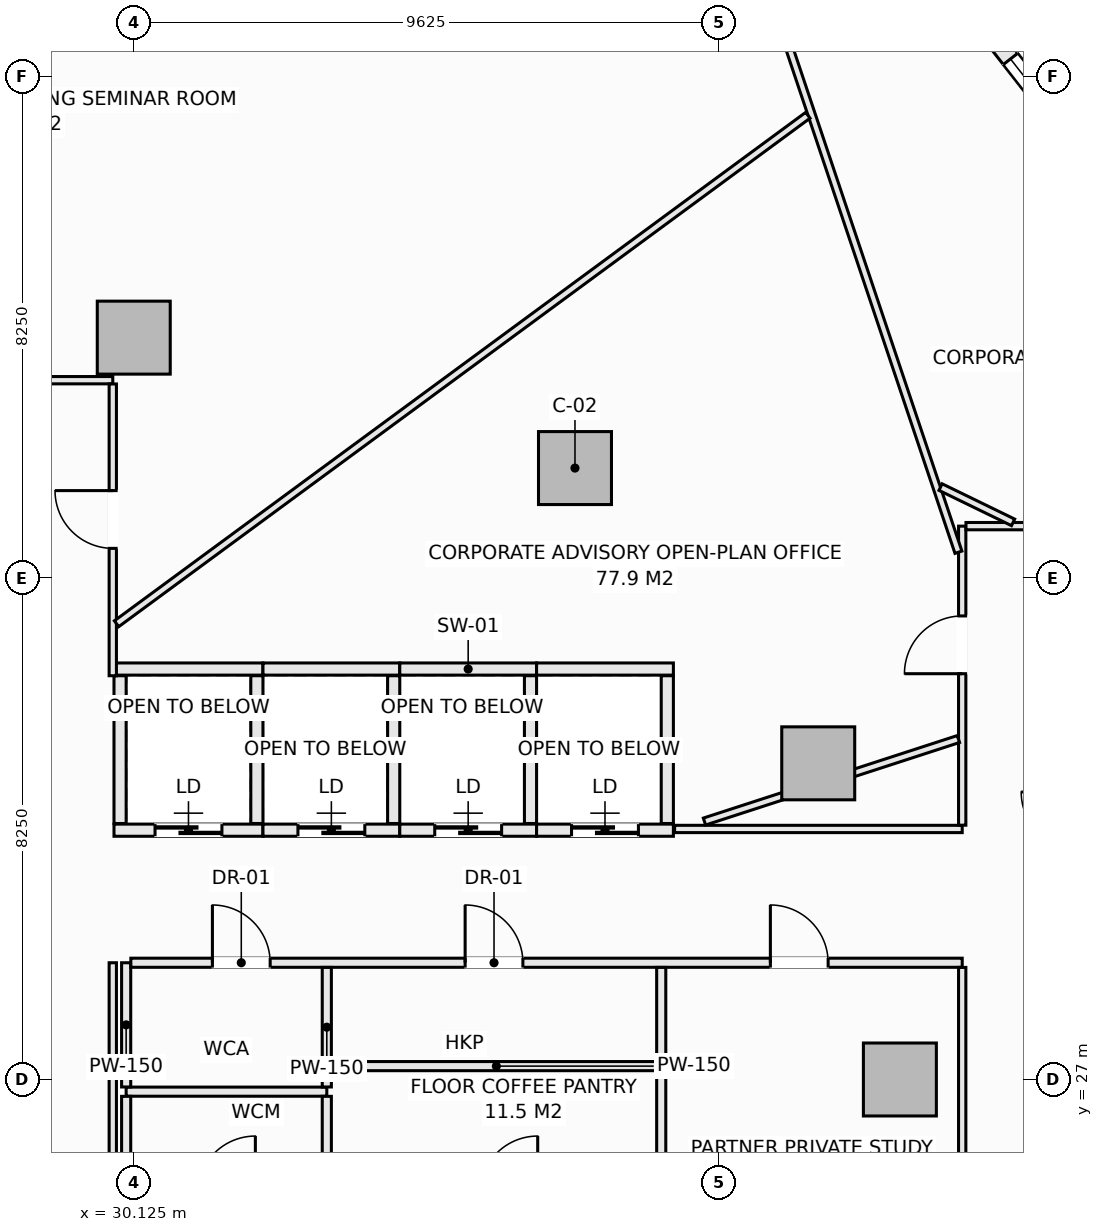
"""IFC4 building model, lengths in metres.
Left out: names, types, materials, properties, quantities, classifications, styles, units other than length and angle.
Written with IfcOpenShell. Run it as: python <this file> out.ifc"""

import sys

from ifc_helpers import new_model, si_unit, direction, frame, frame_2d, origin, origin_2d, place, context, subcontext, project, spatial, rectangle, extrude, element, fill, save


model = new_model("IFC4")
c1 = context("Model", 3, precision=1e-05, world=origin(), true_north=direction((0.0, 1.0)))
c2 = subcontext(c1, "Body", "Model", "MODEL_VIEW")
j1 = project(units=[si_unit("LENGTHUNIT", "METRE"), si_unit("PLANEANGLEUNIT", "RADIAN")], contexts=[c1])
p1 = place(None, origin())
s1 = spatial("IfcSite", under=j1, at=p1, CompositionType="ELEMENT")
p2 = place(p1, origin())
s2 = spatial("IfcBuilding", under=s1, at=p2, CompositionType="ELEMENT")
p3 = place(p2, frame((0.0, 0.0, 88.1)))
s3 = spatial("IfcBuildingStorey", under=s2, at=p3, CompositionType="ELEMENT", Elevation=88.1)
for number, where, z_axis, x_axis in (
    (1, (42.725, 27.0, -0.28), (0.0, 0.0, 1.0), (1.0, 0.0, 0.0)),
    (2, (41.382, 32.199, -0.28), (0.0, 0.0, 1.0), (1.0, 0.0, 0.0)),
    (3, (37.382, 37.055, -0.28), (0.0, 0.0, 1.0), (1.0, 0.0, 0.0)),
    (4, (30.125, 39.2, -0.28), (0.0, 0.0, 1.0), (1.0, 0.0, 0.0)),
):
    element("IfcColumn", number, at=place(p3, frame(where, z_axis=z_axis, x_axis=x_axis)), inside=s3, PredefinedType="COLUMN", context=c2, shape_type="SweptSolid", body=[
        extrude(rectangle(XDim=1.2, YDim=1.2, at=origin_2d()), origin(), (0.0, 0.0, 1.0), 3.85),
    ])
p4 = place(p3, frame((43.344, 45.316, 0.0), z_axis=(0.0, 0.0, 1.0), x_axis=(0.616434798832, -0.78740595552, 0.0)))
e5 = element("IfcWall", 5, at=p4, inside=s3, PredefinedType="SOLIDWALL", context=c2, shape_type="SweptSolid", body=[
    extrude(rectangle(XDim=6.294, YDim=0.3, at=frame_2d((3.147, 0.0))), origin(), (0.0, 0.0, 1.0), 3.093),
])
p5 = place(p4, frame((1.947, 0.0, 0.85)))
e6 = element("IfcOpeningElement", 6, at=p5, cuts=e5, PredefinedType="OPENING", context=c2, shape_type="SweptSolid", body=[
    extrude(rectangle(XDim=2.4, YDim=1.9, at=frame_2d((1.2, 0.95))), frame((0.0, 0.16, 0.0), z_axis=(0.0, -1.0, 0.0), x_axis=(1.0, 0.0, 0.0)), (0.0, 0.0, 1.0), 0.32),
])
p6 = place(p3, frame((29.8, 33.75, 0.0), z_axis=(0.0, 0.0, 1.0), x_axis=(1.0, 0.0, 0.0)))
e7 = element("IfcWall", 7, at=p6, inside=s3, PredefinedType="SOLIDWALL", context=c2, shape_type="SweptSolid", body=[
    extrude(rectangle(XDim=2.45, YDim=0.2, at=frame_2d((1.225, 0.0))), origin(), (0.0, 0.0, 1.0), 3.57),
])
p7 = place(p3, frame((29.8, 31.1, 0.0), z_axis=(0.0, 0.0, 1.0), x_axis=(1.0, 0.0, 0.0)))
e8 = element("IfcWall", 8, at=p7, inside=s3, PredefinedType="SOLIDWALL", context=c2, shape_type="SweptSolid", body=[
    extrude(rectangle(XDim=2.45, YDim=0.2, at=frame_2d((1.225, 0.0))), origin(), (0.0, 0.0, 1.0), 3.57),
])
p8 = place(p7, frame((0.675, 0.0, 0.0)))
e9 = element("IfcOpeningElement", 9, at=p8, cuts=e8, PredefinedType="OPENING", context=c2, shape_type="SweptSolid", body=[
    extrude(rectangle(XDim=1.1, YDim=2.2, at=frame_2d((0.55, 1.1))), frame((0.0, 0.11, 0.0), z_axis=(0.0, -1.0, 0.0), x_axis=(1.0, 0.0, 0.0)), (0.0, 0.0, 1.0), 0.22),
])
for number, where, z_axis, x_axis in (
    (10, (29.9, 31.21, 0.0), (0.0, 0.0, 1.0), (0.0, 1.0, 0.0)),
    (11, (32.15, 31.21, 0.0), (0.0, 0.0, 1.0), (0.0, 1.0, 0.0)),
):
    element("IfcWall", number, at=place(p3, frame(where, z_axis=z_axis, x_axis=x_axis)), inside=s3, PredefinedType="SOLIDWALL", context=c2, shape_type="SweptSolid", body=[
        extrude(rectangle(XDim=2.43, YDim=0.2, at=frame_2d((1.215, 0.0))), origin(), (0.0, 0.0, 1.0), 3.57),
    ])
p9 = place(p3, frame((32.25, 33.75, 0.0), z_axis=(0.0, 0.0, 1.0), x_axis=(1.0, 0.0, 0.0)))
e12 = element("IfcWall", 12, at=p9, inside=s3, PredefinedType="SOLIDWALL", context=c2, shape_type="SweptSolid", body=[
    extrude(rectangle(XDim=2.25, YDim=0.2, at=frame_2d((1.125, 0.0))), origin(), (0.0, 0.0, 1.0), 3.57),
])
p10 = place(p3, frame((32.25, 31.1, 0.0), z_axis=(0.0, 0.0, 1.0), x_axis=(1.0, 0.0, 0.0)))
e13 = element("IfcWall", 13, at=p10, inside=s3, PredefinedType="SOLIDWALL", context=c2, shape_type="SweptSolid", body=[
    extrude(rectangle(XDim=2.25, YDim=0.2, at=frame_2d((1.125, 0.0))), origin(), (0.0, 0.0, 1.0), 3.57),
])
p11 = place(p10, frame((0.575, 0.0, 0.0)))
e14 = element("IfcOpeningElement", 14, at=p11, cuts=e13, PredefinedType="OPENING", context=c2, shape_type="SweptSolid", body=[
    extrude(rectangle(XDim=1.1, YDim=2.2, at=frame_2d((0.55, 1.1))), frame((0.0, 0.11, 0.0), z_axis=(0.0, -1.0, 0.0), x_axis=(1.0, 0.0, 0.0)), (0.0, 0.0, 1.0), 0.22),
])
p12 = place(p3, frame((34.4, 31.21, 0.0), z_axis=(0.0, 0.0, 1.0), x_axis=(0.0, 1.0, 0.0)))
e15 = element("IfcWall", 15, at=p12, inside=s3, PredefinedType="SOLIDWALL", context=c2, shape_type="SweptSolid", body=[
    extrude(rectangle(XDim=2.43, YDim=0.2, at=frame_2d((1.215, 0.0))), origin(), (0.0, 0.0, 1.0), 3.57),
])
p13 = place(p3, frame((34.5, 33.75, 0.0), z_axis=(0.0, 0.0, 1.0), x_axis=(1.0, 0.0, 0.0)))
e16 = element("IfcWall", 16, at=p13, inside=s3, PredefinedType="SOLIDWALL", context=c2, shape_type="SweptSolid", body=[
    extrude(rectangle(XDim=2.25, YDim=0.2, at=frame_2d((1.125, 0.0))), origin(), (0.0, 0.0, 1.0), 3.57),
])
p14 = place(p3, frame((34.5, 31.1, 0.0), z_axis=(0.0, 0.0, 1.0), x_axis=(1.0, 0.0, 0.0)))
e17 = element("IfcWall", 17, at=p14, inside=s3, PredefinedType="SOLIDWALL", context=c2, shape_type="SweptSolid", body=[
    extrude(rectangle(XDim=2.25, YDim=0.2, at=frame_2d((1.125, 0.0))), origin(), (0.0, 0.0, 1.0), 3.57),
])
p15 = place(p14, frame((0.575, 0.0, 0.0)))
e18 = element("IfcOpeningElement", 18, at=p15, cuts=e17, PredefinedType="OPENING", context=c2, shape_type="SweptSolid", body=[
    extrude(rectangle(XDim=1.1, YDim=2.2, at=frame_2d((0.55, 1.1))), frame((0.0, 0.11, 0.0), z_axis=(0.0, -1.0, 0.0), x_axis=(1.0, 0.0, 0.0)), (0.0, 0.0, 1.0), 0.22),
])
p16 = place(p3, frame((36.65, 31.21, 0.0), z_axis=(0.0, 0.0, 1.0), x_axis=(0.0, 1.0, 0.0)))
e19 = element("IfcWall", 19, at=p16, inside=s3, PredefinedType="SOLIDWALL", context=c2, shape_type="SweptSolid", body=[
    extrude(rectangle(XDim=2.43, YDim=0.2, at=frame_2d((1.215, 0.0))), origin(), (0.0, 0.0, 1.0), 3.57),
])
p17 = place(p3, frame((36.75, 33.75, 0.0), z_axis=(0.0, 0.0, 1.0), x_axis=(1.0, 0.0, 0.0)))
e20 = element("IfcWall", 20, at=p17, inside=s3, PredefinedType="SOLIDWALL", context=c2, shape_type="SweptSolid", body=[
    extrude(rectangle(XDim=2.25, YDim=0.2, at=frame_2d((1.125, 0.0))), origin(), (0.0, 0.0, 1.0), 3.57),
])
p18 = place(p3, frame((36.75, 31.1, 0.0), z_axis=(0.0, 0.0, 1.0), x_axis=(1.0, 0.0, 0.0)))
e21 = element("IfcWall", 21, at=p18, inside=s3, PredefinedType="SOLIDWALL", context=c2, shape_type="SweptSolid", body=[
    extrude(rectangle(XDim=2.25, YDim=0.2, at=frame_2d((1.125, 0.0))), origin(), (0.0, 0.0, 1.0), 3.57),
])
p19 = place(p18, frame((0.575, 0.0, 0.0)))
e22 = element("IfcOpeningElement", 22, at=p19, cuts=e21, PredefinedType="OPENING", context=c2, shape_type="SweptSolid", body=[
    extrude(rectangle(XDim=1.1, YDim=2.2, at=frame_2d((0.55, 1.1))), frame((0.0, 0.11, 0.0), z_axis=(0.0, -1.0, 0.0), x_axis=(1.0, 0.0, 0.0)), (0.0, 0.0, 1.0), 0.22),
])
p20 = place(p3, frame((38.9, 31.21, 0.0), z_axis=(0.0, 0.0, 1.0), x_axis=(0.0, 1.0, 0.0)))
e23 = element("IfcWall", 23, at=p20, inside=s3, PredefinedType="SOLIDWALL", context=c2, shape_type="SweptSolid", body=[
    extrude(rectangle(XDim=2.43, YDim=0.2, at=frame_2d((1.215, 0.0))), origin(), (0.0, 0.0, 1.0), 3.57),
])
p21 = place(p3, frame((30.0, 26.8, 0.0), z_axis=(0.0, 0.0, 1.0), x_axis=(1.0, 0.0, 0.0)))
e24 = element("IfcWall", 24, at=p21, inside=s3, PredefinedType="PARTITIONING", context=c2, shape_type="SweptSolid", body=[
    extrude(rectangle(XDim=3.3, YDim=0.15, at=frame_2d((1.65, 0.0))), origin(), (0.0, 0.0, 1.0), 3.57),
])
p22 = place(p3, frame((30.0, 25.12, 0.0), z_axis=(0.0, 0.0, 1.0), x_axis=(0.0, 1.0, 0.0)))
e25 = element("IfcWall", 25, at=p22, inside=s3, PredefinedType="PARTITIONING", context=c2, shape_type="SweptSolid", body=[
    extrude(rectangle(XDim=1.603, YDim=0.15, at=frame_2d((0.801, 0.0))), origin(), (0.0, 0.0, 1.0), 3.57),
])
p23 = place(p3, frame((30.0, 26.877, 0.0), z_axis=(0.0, 0.0, 1.0), x_axis=(0.0, 1.0, 0.0)))
e26 = element("IfcWall", 26, at=p23, inside=s3, PredefinedType="PARTITIONING", context=c2, shape_type="SweptSolid", body=[
    extrude(rectangle(XDim=2.043, YDim=0.15, at=frame_2d((1.021, 0.0))), origin(), (0.0, 0.0, 1.0), 3.57),
])
p24 = place(p3, frame((30.077, 28.92, 0.0), z_axis=(0.0, 0.0, 1.0), x_axis=(1.0, 0.0, 0.0)))
e27 = element("IfcWall", 27, at=p24, inside=s3, PredefinedType="PARTITIONING", context=c2, shape_type="SweptSolid", body=[
    extrude(rectangle(XDim=13.673, YDim=0.15, at=frame_2d((6.836, 0.0))), origin(), (0.0, 0.0, 1.0), 3.57),
])
p25 = place(p24, frame((1.342, 0.0, 0.0)))
e28 = element("IfcOpeningElement", 28, at=p25, cuts=e27, PredefinedType="OPENING", context=c2, shape_type="SweptSolid", body=[
    extrude(rectangle(XDim=0.95, YDim=2.1, at=frame_2d((0.475, 1.05))), frame((0.0, 0.085, 0.0), z_axis=(0.0, -1.0, 0.0), x_axis=(1.0, 0.0, 0.0)), (0.0, 0.0, 1.0), 0.17),
])
p26 = place(p24, frame((5.498, 0.0, 0.0)))
e29 = element("IfcOpeningElement", 29, at=p26, cuts=e27, PredefinedType="OPENING", context=c2, shape_type="SweptSolid", body=[
    extrude(rectangle(XDim=0.95, YDim=2.1, at=frame_2d((0.475, 1.05))), frame((0.0, 0.085, 0.0), z_axis=(0.0, -1.0, 0.0), x_axis=(1.0, 0.0, 0.0)), (0.0, 0.0, 1.0), 0.17),
])
p27 = place(p24, frame((10.518, 0.0, 0.0)))
e30 = element("IfcOpeningElement", 30, at=p27, cuts=e27, PredefinedType="OPENING", context=c2, shape_type="SweptSolid", body=[
    extrude(rectangle(XDim=0.95, YDim=2.1, at=frame_2d((0.475, 1.05))), frame((0.0, 0.085, 0.0), z_axis=(0.0, -1.0, 0.0), x_axis=(1.0, 0.0, 0.0)), (0.0, 0.0, 1.0), 0.17),
])
p28 = place(p3, frame((33.3, 25.12, 0.0), z_axis=(0.0, 0.0, 1.0), x_axis=(0.0, 1.0, 0.0)))
e31 = element("IfcWall", 31, at=p28, inside=s3, PredefinedType="PARTITIONING", context=c2, shape_type="SweptSolid", body=[
    extrude(rectangle(XDim=1.603, YDim=0.15, at=frame_2d((0.801, 0.0))), origin(), (0.0, 0.0, 1.0), 3.57),
])
p29 = place(p3, frame((33.3, 26.877, 0.0), z_axis=(0.0, 0.0, 1.0), x_axis=(0.0, 1.0, 0.0)))
e32 = element("IfcWall", 32, at=p29, inside=s3, PredefinedType="PARTITIONING", context=c2, shape_type="SweptSolid", body=[
    extrude(rectangle(XDim=1.966, YDim=0.15, at=frame_2d((0.983, 0.0))), origin(), (0.0, 0.0, 1.0), 3.57),
])
p30 = place(p3, frame((33.377, 27.22, 0.0), z_axis=(0.0, 0.0, 1.0), x_axis=(1.0, 0.0, 0.0)))
e33 = element("IfcWall", 33, at=p30, inside=s3, PredefinedType="PARTITIONING", context=c2, shape_type="SweptSolid", body=[
    extrude(rectangle(XDim=5.423, YDim=0.15, at=frame_2d((2.711, 0.0))), origin(), (0.0, 0.0, 1.0), 3.57),
])
p31 = place(p3, frame((38.8, 25.197, 0.0), z_axis=(0.0, 0.0, 1.0), x_axis=(0.0, 1.0, 0.0)))
e34 = element("IfcWall", 34, at=p31, inside=s3, PredefinedType="PARTITIONING", context=c2, shape_type="SweptSolid", body=[
    extrude(rectangle(XDim=1.946, YDim=0.15, at=frame_2d((0.973, 0.0))), origin(), (0.0, 0.0, 1.0), 3.57),
])
p32 = place(p3, frame((38.8, 27.297, 0.0), z_axis=(0.0, 0.0, 1.0), x_axis=(0.0, 1.0, 0.0)))
e35 = element("IfcWall", 35, at=p32, inside=s3, PredefinedType="PARTITIONING", context=c2, shape_type="SweptSolid", body=[
    extrude(rectangle(XDim=1.546, YDim=0.15, at=frame_2d((0.773, 0.0))), origin(), (0.0, 0.0, 1.0), 3.57),
])
p33 = place(p3, frame((27.25, 38.5, 0.0), z_axis=(0.0, 0.0, 1.0), x_axis=(1.0, 0.0, 0.0)))
e36 = element("IfcWall", 36, at=p33, inside=s3, PredefinedType="PARTITIONING", context=c2, shape_type="SweptSolid", body=[
    extrude(rectangle(XDim=2.53, YDim=0.12, at=frame_2d((1.265, 0.0))), origin(), (0.0, 0.0, 1.0), 3.57),
])
p34 = place(p3, frame((29.78, 25.12, 0.0), z_axis=(0.0, 0.0, 1.0), x_axis=(0.0, 1.0, 0.0)))
e37 = element("IfcWall", 37, at=p34, inside=s3, PredefinedType="PARTITIONING", context=c2, shape_type="SweptSolid", body=[
    extrude(rectangle(XDim=3.8, YDim=0.12, at=frame_2d((1.9, 0.0))), origin(), (0.0, 0.0, 1.0), 3.57),
])
p35 = place(p3, frame((29.78, 33.64, 0.0), z_axis=(0.0, 0.0, 1.0), x_axis=(0.0, 1.0, 0.0)))
e38 = element("IfcWall", 38, at=p35, inside=s3, PredefinedType="PARTITIONING", context=c2, shape_type="SweptSolid", body=[
    extrude(rectangle(XDim=4.798, YDim=0.12, at=frame_2d((2.399, 0.0))), origin(), (0.0, 0.0, 1.0), 3.57),
])
p36 = place(p35, frame((2.094, 0.0, 0.0)))
e39 = element("IfcOpeningElement", 39, at=p36, cuts=e38, PredefinedType="OPENING", context=c2, shape_type="SweptSolid", body=[
    extrude(rectangle(XDim=0.95, YDim=2.1, at=frame_2d((0.475, 1.05))), frame((0.0, 0.07, 0.0), z_axis=(0.0, -1.0, 0.0), x_axis=(1.0, 0.0, 0.0)), (0.0, 0.0, 1.0), 0.14),
])
p37 = place(p3, frame((39.02, 31.12, 0.0), z_axis=(0.0, 0.0, 1.0), x_axis=(1.0, 0.0, 0.0)))
e40 = element("IfcWall", 40, at=p37, inside=s3, PredefinedType="PARTITIONING", context=c2, shape_type="SweptSolid", body=[
    extrude(rectangle(XDim=4.73, YDim=0.12, at=frame_2d((2.365, 0.0))), origin(), (0.0, 0.0, 1.0), 3.57),
])
p38 = place(p3, frame((43.75, 25.197, 0.0), z_axis=(0.0, 0.0, 1.0), x_axis=(0.0, 1.0, 0.0)))
e41 = element("IfcWall", 41, at=p38, inside=s3, PredefinedType="PARTITIONING", context=c2, shape_type="SweptSolid", body=[
    extrude(rectangle(XDim=3.646, YDim=0.12, at=frame_2d((1.823, 0.0))), origin(), (0.0, 0.0, 1.0), 3.57),
])
p39 = place(p3, frame((43.75, 31.182, 0.0), z_axis=(0.0, 0.0, 1.0), x_axis=(0.0, 1.0, 0.0)))
e42 = element("IfcWall", 42, at=p39, inside=s3, PredefinedType="PARTITIONING", context=c2, shape_type="SweptSolid", body=[
    extrude(rectangle(XDim=4.918, YDim=0.12, at=frame_2d((2.459, 0.0))), origin(), (0.0, 0.0, 1.0), 3.57),
])
p40 = place(p39, frame((2.491, 0.0, 0.0)))
e43 = element("IfcOpeningElement", 43, at=p40, cuts=e42, PredefinedType="OPENING", context=c2, shape_type="SweptSolid", body=[
    extrude(rectangle(XDim=0.95, YDim=2.1, at=frame_2d((0.475, 1.05))), frame((0.0, 0.07, 0.0), z_axis=(0.0, -1.0, 0.0), x_axis=(1.0, 0.0, 0.0)), (0.0, 0.0, 1.0), 0.14),
])
p41 = place(p3, frame((43.812, 36.1, 0.0), z_axis=(0.0, 0.0, 1.0), x_axis=(1.0, 0.0, 0.0)))
e44 = element("IfcWall", 44, at=p41, inside=s3, PredefinedType="PARTITIONING", context=c2, shape_type="SweptSolid", body=[
    extrude(rectangle(XDim=4.012, YDim=0.12, at=frame_2d((2.006, 0.0))), origin(), (0.0, 0.0, 1.0), 3.57),
])
p42 = place(p41, frame((1.623, 0.0, 0.0)))
e45 = element("IfcOpeningElement", 45, at=p42, cuts=e44, PredefinedType="OPENING", context=c2, shape_type="SweptSolid", body=[
    extrude(rectangle(XDim=0.95, YDim=2.1, at=frame_2d((0.475, 1.05))), frame((0.0, 0.07, 0.0), z_axis=(0.0, -1.0, 0.0), x_axis=(1.0, 0.0, 0.0)), (0.0, 0.0, 1.0), 0.14),
])
p43 = place(p3, frame((40.15, 46.215, 0.0), z_axis=(0.0, 0.0, 1.0), x_axis=(0.318097538603, -0.948057991863, 0.0)))
e46 = element("IfcWall", 46, at=p43, inside=s3, PredefinedType="PARTITIONING", context=c2, shape_type="SweptSolid", body=[
    extrude(rectangle(XDim=11.121, YDim=0.12, at=frame_2d((5.561, 0.0))), origin(), (0.0, 0.0, 1.0), 3.57),
])
p44 = place(p3, frame((39.511, 31.242, 0.0), z_axis=(0.0, 0.0, 1.0), x_axis=(0.951052042302, 0.30903076357, 0.0)))
e47 = element("IfcWall", 47, at=p44, inside=s3, PredefinedType="PARTITIONING", context=c2, shape_type="SweptSolid", body=[
    extrude(rectangle(XDim=4.392, YDim=0.12, at=frame_2d((2.196, 0.0))), origin(), (0.0, 0.0, 1.0), 3.57),
])
p45 = place(p3, frame((43.394, 36.742, 0.0), z_axis=(0.0, 0.0, 1.0), x_axis=(0.899305525601, -0.437320902339, 0.0)))
e48 = element("IfcWall", 48, at=p45, inside=s3, PredefinedType="PARTITIONING", context=c2, shape_type="SweptSolid", body=[
    extrude(rectangle(XDim=1.326, YDim=0.12, at=frame_2d((0.663, 0.0))), origin(), (0.0, 0.0, 1.0), 3.57),
])
p46 = place(p3, frame((29.842, 34.495, 0.0), z_axis=(0.0, 0.0, 1.0), x_axis=(0.805582047077, 0.592484232219, 0.0)))
e49 = element("IfcWall", 49, at=p46, inside=s3, PredefinedType="PARTITIONING", context=c2, shape_type="SweptSolid", body=[
    extrude(rectangle(XDim=14.114, YDim=0.12, at=frame_2d((7.057, 0.0))), origin(), (0.0, 0.0, 1.0), 2.934),
])
p47 = place(p5, origin())
e50 = element("IfcWindow", 50, at=p47, inside=s3, PartitioningType="SINGLE_PANEL", PredefinedType="WINDOW", context=c2, shape_type="SweptSolid", body=[
    extrude(rectangle(XDim=2.4, YDim=1.9, at=frame_2d((1.2, 0.95))), frame((0.0, 0.03, 0.0), z_axis=(0.0, -1.0, 0.0), x_axis=(1.0, 0.0, 0.0)), (0.0, 0.0, 1.0), 0.06),
])
fill(e6, e50)
p48 = place(p8, origin())
e51 = element("IfcDoor", 51, at=p48, inside=s3, OperationType="SLIDING_TO_LEFT", PredefinedType="DOOR", context=c2, shape_type="SweptSolid", body=[
    extrude(rectangle(XDim=1.1, YDim=2.2, at=frame_2d((0.55, 1.1))), frame((0.0, 0.025, 0.0), z_axis=(0.0, -1.0, 0.0), x_axis=(1.0, 0.0, 0.0)), (0.0, 0.0, 1.0), 0.05),
])
fill(e9, e51)
p49 = place(p11, origin())
e52 = element("IfcDoor", 52, at=p49, inside=s3, OperationType="SLIDING_TO_LEFT", PredefinedType="DOOR", context=c2, shape_type="SweptSolid", body=[
    extrude(rectangle(XDim=1.1, YDim=2.2, at=frame_2d((0.55, 1.1))), frame((0.0, 0.025, 0.0), z_axis=(0.0, -1.0, 0.0), x_axis=(1.0, 0.0, 0.0)), (0.0, 0.0, 1.0), 0.05),
])
fill(e14, e52)
p50 = place(p15, origin())
e53 = element("IfcDoor", 53, at=p50, inside=s3, OperationType="SLIDING_TO_LEFT", PredefinedType="DOOR", context=c2, shape_type="SweptSolid", body=[
    extrude(rectangle(XDim=1.1, YDim=2.2, at=frame_2d((0.55, 1.1))), frame((0.0, 0.025, 0.0), z_axis=(0.0, -1.0, 0.0), x_axis=(1.0, 0.0, 0.0)), (0.0, 0.0, 1.0), 0.05),
])
fill(e18, e53)
p51 = place(p19, origin())
e54 = element("IfcDoor", 54, at=p51, inside=s3, OperationType="SLIDING_TO_LEFT", PredefinedType="DOOR", context=c2, shape_type="SweptSolid", body=[
    extrude(rectangle(XDim=1.1, YDim=2.2, at=frame_2d((0.55, 1.1))), frame((0.0, 0.025, 0.0), z_axis=(0.0, -1.0, 0.0), x_axis=(1.0, 0.0, 0.0)), (0.0, 0.0, 1.0), 0.05),
])
fill(e22, e54)
p52 = place(p25, origin())
e55 = element("IfcDoor", 55, at=p52, inside=s3, OperationType="SINGLE_SWING_LEFT", PredefinedType="DOOR", context=c2, shape_type="SweptSolid", body=[
    extrude(rectangle(XDim=0.95, YDim=2.1, at=frame_2d((0.475, 1.05))), frame((0.0, 0.025, 0.0), z_axis=(0.0, -1.0, 0.0), x_axis=(1.0, 0.0, 0.0)), (0.0, 0.0, 1.0), 0.05),
])
fill(e28, e55)
p53 = place(p26, origin())
e56 = element("IfcDoor", 56, at=p53, inside=s3, OperationType="SINGLE_SWING_LEFT", PredefinedType="DOOR", context=c2, shape_type="SweptSolid", body=[
    extrude(rectangle(XDim=0.95, YDim=2.1, at=frame_2d((0.475, 1.05))), frame((0.0, 0.025, 0.0), z_axis=(0.0, -1.0, 0.0), x_axis=(1.0, 0.0, 0.0)), (0.0, 0.0, 1.0), 0.05),
])
fill(e29, e56)
p54 = place(p27, origin())
e57 = element("IfcDoor", 57, at=p54, inside=s3, OperationType="SINGLE_SWING_LEFT", PredefinedType="DOOR", context=c2, shape_type="SweptSolid", body=[
    extrude(rectangle(XDim=0.95, YDim=2.1, at=frame_2d((0.475, 1.05))), frame((0.0, 0.025, 0.0), z_axis=(0.0, -1.0, 0.0), x_axis=(1.0, 0.0, 0.0)), (0.0, 0.0, 1.0), 0.05),
])
fill(e30, e57)
p55 = place(p40, origin())
e58 = element("IfcDoor", 58, at=p55, inside=s3, OperationType="SINGLE_SWING_LEFT", PredefinedType="DOOR", context=c2, shape_type="SweptSolid", body=[
    extrude(rectangle(XDim=0.95, YDim=2.1, at=frame_2d((0.475, 1.05))), frame((0.0, 0.025, 0.0), z_axis=(0.0, -1.0, 0.0), x_axis=(1.0, 0.0, 0.0)), (0.0, 0.0, 1.0), 0.05),
])
fill(e43, e58)
p56 = place(p36, origin())
e59 = element("IfcDoor", 59, at=p56, inside=s3, OperationType="SINGLE_SWING_RIGHT", PredefinedType="DOOR", context=c2, shape_type="SweptSolid", body=[
    extrude(rectangle(XDim=0.95, YDim=2.1, at=frame_2d((0.475, 1.05))), frame((0.0, 0.025, 0.0), z_axis=(0.0, -1.0, 0.0), x_axis=(1.0, 0.0, 0.0)), (0.0, 0.0, 1.0), 0.05),
])
fill(e39, e59)
save(model, sys.argv[1])
